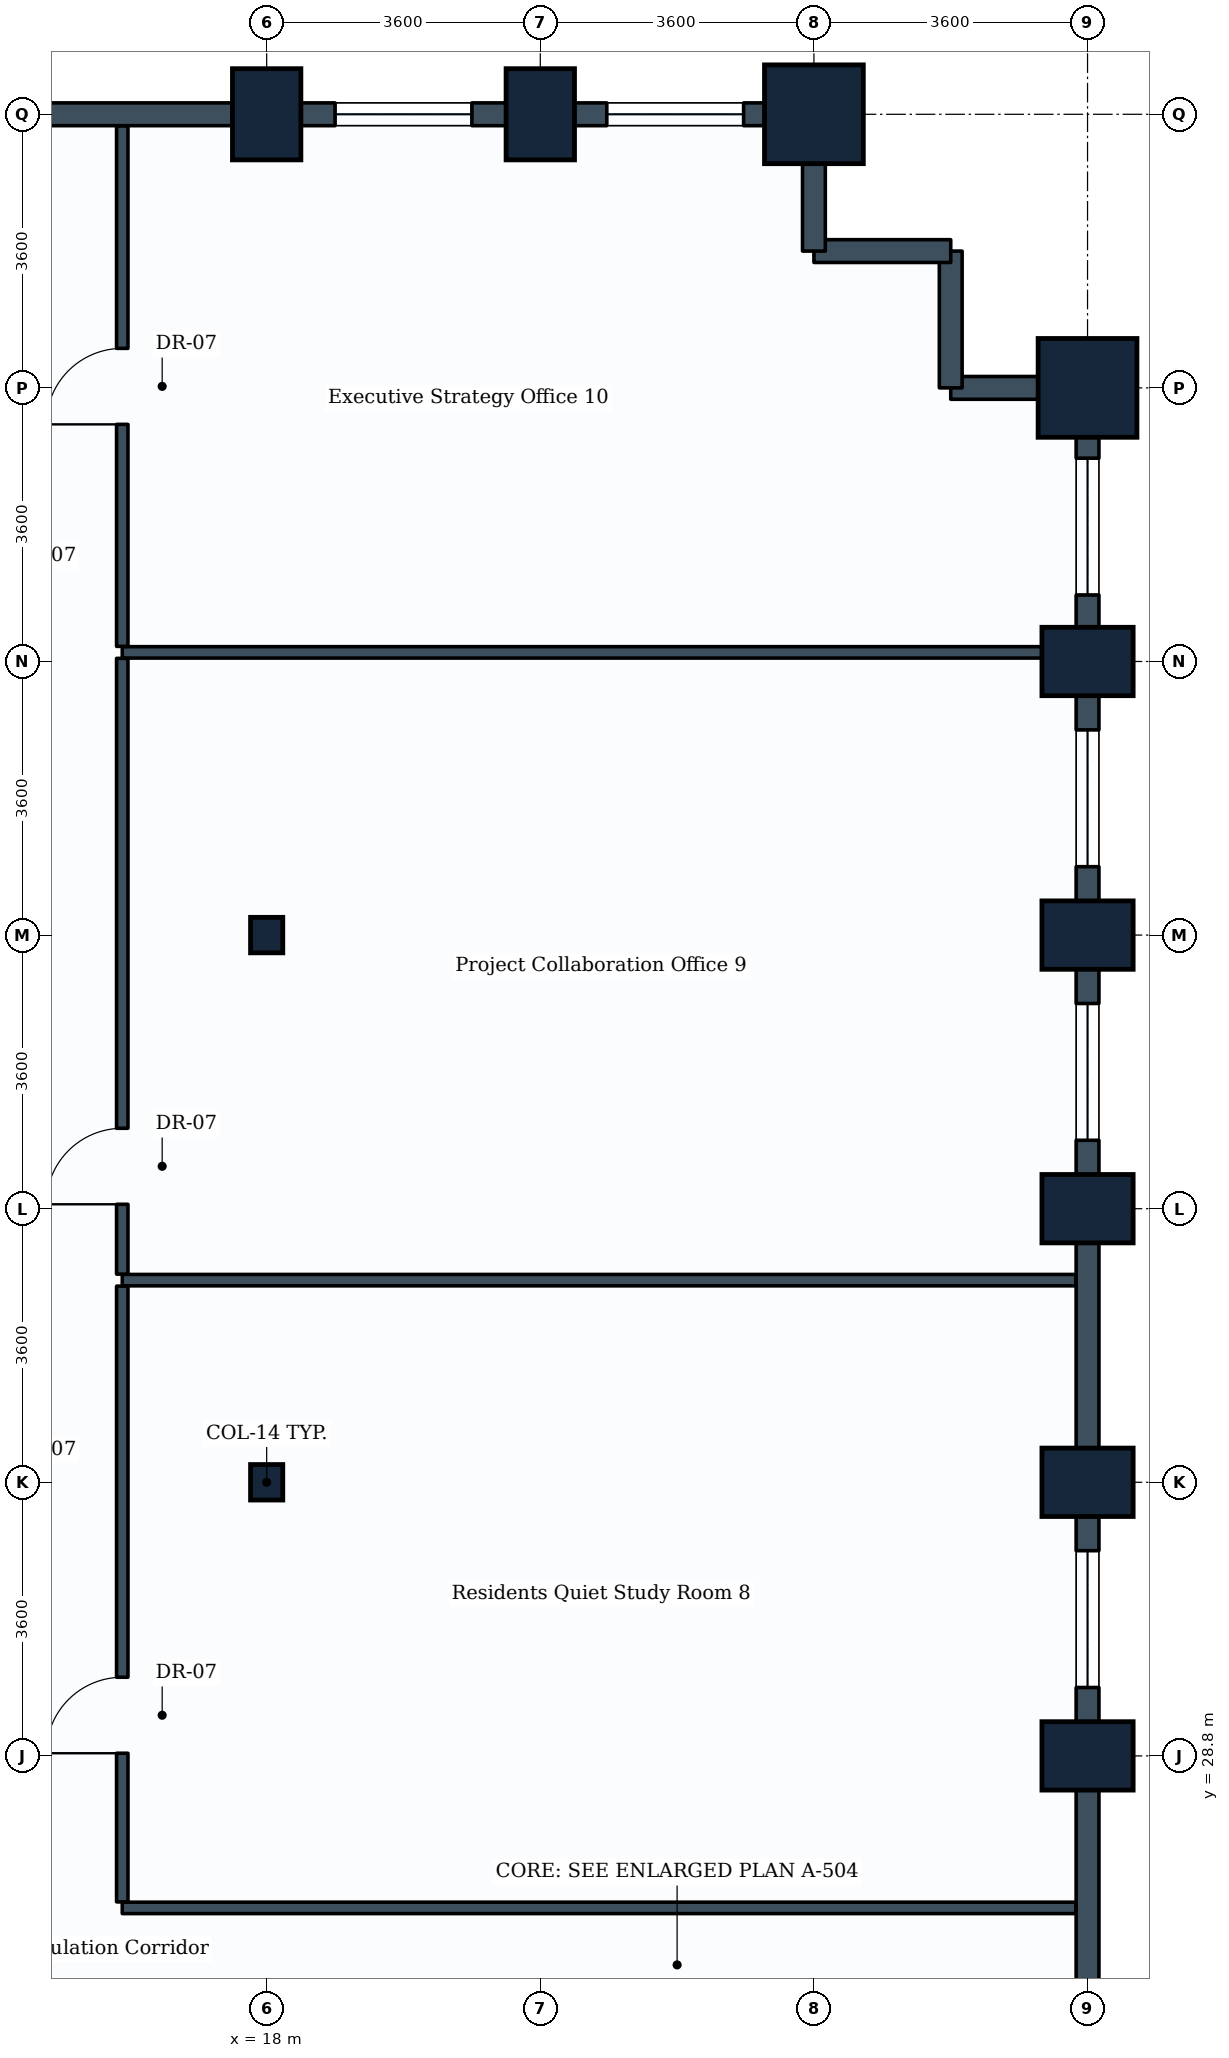
"""IFC4 building model, lengths in metres.
Left out: names, types, materials, properties, quantities, classifications, styles, units other than length and angle.
Written with IfcOpenShell. Run it as: python <this file> out.ifc"""

import sys

from ifc_helpers import new_model, si_unit, direction, frame, frame_2d, origin, origin_2d, place, context, subcontext, project, spatial, rectangle, i_section, extrude, element, fill, save


model = new_model("IFC4")
c1 = context("Model", 3, precision=1e-05, world=origin(), true_north=direction((0.0, 1.0)))
c2 = subcontext(c1, "Body", "Model", "MODEL_VIEW")
j1 = project(units=[si_unit("LENGTHUNIT", "METRE"), si_unit("PLANEANGLEUNIT", "RADIAN")], contexts=[c1])
p1 = place(None, origin())
s1 = spatial("IfcSite", under=j1, at=p1, CompositionType="ELEMENT")
p2 = place(p1, origin())
s2 = spatial("IfcBuilding", under=s1, at=p2, CompositionType="ELEMENT")
p3 = place(p2, frame((0.0, 0.0, 63.0)))
s3 = spatial("IfcBuildingStorey", under=s2, at=p3, CompositionType="ELEMENT", Elevation=63.0)
for number, where, z_axis, x_axis in (
    (1, (18.0, 32.4, 0.0), (0.0, 0.0, 1.0), (1.0, 0.0, 0.0)),
    (2, (18.0, 39.6, 0.0), (0.0, 0.0, 1.0), (1.0, 0.0, 0.0)),
):
    element("IfcColumn", number, at=place(p3, frame(where, z_axis=z_axis, x_axis=x_axis)), inside=s3, PredefinedType="COLUMN", context=c2, shape_type="SweptSolid", body=[
        extrude(i_section(OverallWidth=0.424, OverallDepth=0.467, WebThickness=0.033, FlangeThickness=0.053, FilletRadius=0.015, at=origin_2d()), origin(), (0.0, 0.0, 1.0), 3.9),
    ])
for number, where, z_axis, x_axis in (
    (3, (18.0, 50.4, 0.0), (0.0, 0.0, 1.0), (1.0, 0.0, 0.0)),
    (4, (21.6, 50.4, 0.0), (0.0, 0.0, 1.0), (1.0, 0.0, 0.0)),
):
    element("IfcColumn", number, at=place(p3, frame(where, z_axis=z_axis, x_axis=x_axis)), inside=s3, PredefinedType="COLUMN", context=c2, shape_type="SweptSolid", body=[
        extrude(rectangle(XDim=0.9, YDim=1.2, at=origin_2d()), origin(), (0.0, 0.0, 1.0), 3.9),
    ])
p4 = place(p3, frame((25.2, 50.4, 0.0), z_axis=(0.0, 0.0, 1.0), x_axis=(1.0, 0.0, 0.0)))
e5 = element("IfcColumn", 5, at=p4, inside=s3, PredefinedType="COLUMN", context=c2, shape_type="SweptSolid", body=[
    extrude(rectangle(XDim=1.3, YDim=1.3, at=origin_2d()), origin(), (0.0, 0.0, 1.0), 3.9),
])
for number, where, z_axis, x_axis in (
    (6, (28.8, 28.8, 0.0), (0.0, 0.0, 1.0), (0.0, 1.0, 0.0)),
    (7, (28.8, 32.4, 0.0), (0.0, 0.0, 1.0), (0.0, 1.0, 0.0)),
    (8, (28.8, 36.0, 0.0), (0.0, 0.0, 1.0), (0.0, 1.0, 0.0)),
    (9, (28.8, 39.6, 0.0), (0.0, 0.0, 1.0), (0.0, 1.0, 0.0)),
    (10, (28.8, 43.2, 0.0), (0.0, 0.0, 1.0), (0.0, 1.0, 0.0)),
):
    element("IfcColumn", number, at=place(p3, frame(where, z_axis=z_axis, x_axis=x_axis)), inside=s3, PredefinedType="COLUMN", context=c2, shape_type="SweptSolid", body=[
        extrude(rectangle(XDim=0.9, YDim=1.2, at=origin_2d()), origin(), (0.0, 0.0, 1.0), 3.9),
    ])
p5 = place(p3, frame((28.8, 46.8, 0.0), z_axis=(0.0, 0.0, 1.0), x_axis=(0.0, 1.0, 0.0)))
e11 = element("IfcColumn", 11, at=p5, inside=s3, PredefinedType="COLUMN", context=c2, shape_type="SweptSolid", body=[
    extrude(rectangle(XDim=1.3, YDim=1.3, at=origin_2d()), origin(), (0.0, 0.0, 1.0), 3.9),
])
p6 = place(p3, frame((28.8, 25.2, 0.0), z_axis=(0.0, 0.0, 1.0), x_axis=(0.0, 1.0, 0.0)))
e12 = element("IfcWall", 12, at=p6, inside=s3, PredefinedType="STANDARD", context=c2, shape_type="SweptSolid", body=[
    extrude(rectangle(XDim=3.6, YDim=0.3, at=frame_2d((1.8, 0.0))), origin(), (0.0, 0.0, 1.0), 3.14),
])
p7 = place(p3, frame((28.8, 28.8, 0.0), z_axis=(0.0, 0.0, 1.0), x_axis=(0.0, 1.0, 0.0)))
e13 = element("IfcWall", 13, at=p7, inside=s3, PredefinedType="STANDARD", context=c2, shape_type="SweptSolid", body=[
    extrude(rectangle(XDim=3.6, YDim=0.3, at=frame_2d((1.8, 0.0))), origin(), (0.0, 0.0, 1.0), 2.93),
])
p8 = place(p7, frame((0.9, 0.0, 0.85)))
e14 = element("IfcOpeningElement", 14, at=p8, cuts=e13, PredefinedType="OPENING", context=c2, shape_type="SweptSolid", body=[
    extrude(rectangle(XDim=1.8, YDim=1.35, at=frame_2d((0.9, 0.675))), frame((0.0, 0.16, 0.0), z_axis=(0.0, -1.0, 0.0), x_axis=(1.0, 0.0, 0.0)), (0.0, 0.0, 1.0), 0.32),
])
p9 = place(p3, frame((28.8, 32.4, 0.0), z_axis=(0.0, 0.0, 1.0), x_axis=(0.0, 1.0, 0.0)))
e15 = element("IfcWall", 15, at=p9, inside=s3, PredefinedType="STANDARD", context=c2, shape_type="SweptSolid", body=[
    extrude(rectangle(XDim=3.6, YDim=0.3, at=frame_2d((1.8, 0.0))), origin(), (0.0, 0.0, 1.0), 2.93),
])
p10 = place(p3, frame((28.8, 36.0, 0.0), z_axis=(0.0, 0.0, 1.0), x_axis=(0.0, 1.0, 0.0)))
e16 = element("IfcWall", 16, at=p10, inside=s3, PredefinedType="STANDARD", context=c2, shape_type="SweptSolid", body=[
    extrude(rectangle(XDim=3.6, YDim=0.3, at=frame_2d((1.8, 0.0))), origin(), (0.0, 0.0, 1.0), 2.93),
])
p11 = place(p10, frame((0.9, 0.0, 0.85)))
e17 = element("IfcOpeningElement", 17, at=p11, cuts=e16, PredefinedType="OPENING", context=c2, shape_type="SweptSolid", body=[
    extrude(rectangle(XDim=1.8, YDim=1.35, at=frame_2d((0.9, 0.675))), frame((0.0, 0.16, 0.0), z_axis=(0.0, -1.0, 0.0), x_axis=(1.0, 0.0, 0.0)), (0.0, 0.0, 1.0), 0.32),
])
p12 = place(p3, frame((28.8, 39.6, 0.0), z_axis=(0.0, 0.0, 1.0), x_axis=(0.0, 1.0, 0.0)))
e18 = element("IfcWall", 18, at=p12, inside=s3, PredefinedType="STANDARD", context=c2, shape_type="SweptSolid", body=[
    extrude(rectangle(XDim=3.6, YDim=0.3, at=frame_2d((1.8, 0.0))), origin(), (0.0, 0.0, 1.0), 2.93),
])
p13 = place(p12, frame((0.9, 0.0, 0.85)))
e19 = element("IfcOpeningElement", 19, at=p13, cuts=e18, PredefinedType="OPENING", context=c2, shape_type="SweptSolid", body=[
    extrude(rectangle(XDim=1.8, YDim=1.35, at=frame_2d((0.9, 0.675))), frame((0.0, 0.16, 0.0), z_axis=(0.0, -1.0, 0.0), x_axis=(1.0, 0.0, 0.0)), (0.0, 0.0, 1.0), 0.32),
])
p14 = place(p3, frame((28.8, 43.2, 0.0), z_axis=(0.0, 0.0, 1.0), x_axis=(0.0, 1.0, 0.0)))
e20 = element("IfcWall", 20, at=p14, inside=s3, PredefinedType="STANDARD", context=c2, shape_type="SweptSolid", body=[
    extrude(rectangle(XDim=3.6, YDim=0.3, at=frame_2d((1.8, 0.0))), origin(), (0.0, 0.0, 1.0), 2.93),
])
p15 = place(p14, frame((0.875, 0.0, 0.85)))
e21 = element("IfcOpeningElement", 21, at=p15, cuts=e20, PredefinedType="OPENING", context=c2, shape_type="SweptSolid", body=[
    extrude(rectangle(XDim=1.8, YDim=1.35, at=frame_2d((0.9, 0.675))), frame((0.0, 0.16, 0.0), z_axis=(0.0, -1.0, 0.0), x_axis=(1.0, 0.0, 0.0)), (0.0, 0.0, 1.0), 0.32),
])
p16 = place(p3, frame((27.0, 46.8, 0.0), z_axis=(0.0, 0.0, 1.0), x_axis=(1.0, 0.0, 0.0)))
e22 = element("IfcWall", 22, at=p16, inside=s3, PredefinedType="STANDARD", context=c2, shape_type="SweptSolid", body=[
    extrude(rectangle(XDim=1.8, YDim=0.3, at=frame_2d((0.9, 0.0))), origin(), (0.0, 0.0, 1.0), 2.93),
])
for number, where, z_axis, x_axis in (
    (23, (27.0, 46.8, 0.0), (0.0, 0.0, 1.0), (0.0, 1.0, 0.0)),
    (24, (25.2, 48.6, 0.0), (0.0, 0.0, 1.0), (1.0, 0.0, 0.0)),
):
    element("IfcWall", number, at=place(p3, frame(where, z_axis=z_axis, x_axis=x_axis)), inside=s3, PredefinedType="STANDARD", context=c2, shape_type="SweptSolid", body=[
        extrude(rectangle(XDim=1.8, YDim=0.3, at=frame_2d((0.9, 0.0))), origin(), (0.0, 0.0, 1.0), 3.635),
    ])
p17 = place(p3, frame((25.2, 48.6, 0.0), z_axis=(0.0, 0.0, 1.0), x_axis=(0.0, 1.0, 0.0)))
e25 = element("IfcWall", 25, at=p17, inside=s3, PredefinedType="STANDARD", context=c2, shape_type="SweptSolid", body=[
    extrude(rectangle(XDim=1.8, YDim=0.3, at=frame_2d((0.9, 0.0))), origin(), (0.0, 0.0, 1.0), 2.93),
])
p18 = place(p3, frame((21.6, 50.4, 0.0), z_axis=(0.0, 0.0, 1.0), x_axis=(1.0, 0.0, 0.0)))
e26 = element("IfcWall", 26, at=p18, inside=s3, PredefinedType="STANDARD", context=c2, shape_type="SweptSolid", body=[
    extrude(rectangle(XDim=3.6, YDim=0.3, at=frame_2d((1.8, 0.0))), origin(), (0.0, 0.0, 1.0), 2.93),
])
p19 = place(p18, frame((0.875, 0.0, 0.85)))
e27 = element("IfcOpeningElement", 27, at=p19, cuts=e26, PredefinedType="OPENING", context=c2, shape_type="SweptSolid", body=[
    extrude(rectangle(XDim=1.8, YDim=1.35, at=frame_2d((0.9, 0.675))), frame((0.0, 0.16, 0.0), z_axis=(0.0, -1.0, 0.0), x_axis=(1.0, 0.0, 0.0)), (0.0, 0.0, 1.0), 0.32),
])
p20 = place(p3, frame((18.0, 50.4, 0.0), z_axis=(0.0, 0.0, 1.0), x_axis=(1.0, 0.0, 0.0)))
e28 = element("IfcWall", 28, at=p20, inside=s3, PredefinedType="STANDARD", context=c2, shape_type="SweptSolid", body=[
    extrude(rectangle(XDim=3.6, YDim=0.3, at=frame_2d((1.8, 0.0))), origin(), (0.0, 0.0, 1.0), 2.93),
])
p21 = place(p20, frame((0.9, 0.0, 0.85)))
e29 = element("IfcOpeningElement", 29, at=p21, cuts=e28, PredefinedType="OPENING", context=c2, shape_type="SweptSolid", body=[
    extrude(rectangle(XDim=1.8, YDim=1.35, at=frame_2d((0.9, 0.675))), frame((0.0, 0.16, 0.0), z_axis=(0.0, -1.0, 0.0), x_axis=(1.0, 0.0, 0.0)), (0.0, 0.0, 1.0), 0.32),
])
p22 = place(p3, frame((14.4, 50.4, 0.0), z_axis=(0.0, 0.0, 1.0), x_axis=(1.0, 0.0, 0.0)))
e30 = element("IfcWall", 30, at=p22, inside=s3, PredefinedType="STANDARD", context=c2, shape_type="SweptSolid", body=[
    extrude(rectangle(XDim=3.6, YDim=0.3, at=frame_2d((1.8, 0.0))), origin(), (0.0, 0.0, 1.0), 2.93),
])
p23 = place(p3, frame((16.1, 26.8, 0.0), z_axis=(0.0, 0.0, 1.0), x_axis=(1.0, 0.0, 0.0)))
e31 = element("IfcWall", 31, at=p23, inside=s3, PredefinedType="PARTITIONING", context=c2, shape_type="SweptSolid", body=[
    extrude(rectangle(XDim=12.546, YDim=0.15, at=frame_2d((6.273, 0.0))), origin(), (0.0, 0.0, 1.0), 3.08),
])
p24 = place(p3, frame((16.1, 35.06, 0.0), z_axis=(0.0, 0.0, 1.0), x_axis=(1.0, 0.0, 0.0)))
e32 = element("IfcWall", 32, at=p24, inside=s3, PredefinedType="PARTITIONING", context=c2, shape_type="SweptSolid", body=[
    extrude(rectangle(XDim=12.546, YDim=0.15, at=frame_2d((6.273, 0.0))), origin(), (0.0, 0.0, 1.0), 2.93),
])
p25 = place(p3, frame((16.1, 26.879, 0.0), z_axis=(0.0, 0.0, 1.0), x_axis=(0.0, 1.0, 0.0)))
e33 = element("IfcWall", 33, at=p25, inside=s3, PredefinedType="PARTITIONING", context=c2, shape_type="SweptSolid", body=[
    extrude(rectangle(XDim=8.102, YDim=0.15, at=frame_2d((4.051, 0.0))), origin(), (0.0, 0.0, 1.0), 3.08),
])
p26 = place(p25, frame((1.956, 0.0, 0.0)))
e34 = element("IfcOpeningElement", 34, at=p26, cuts=e33, PredefinedType="OPENING", context=c2, shape_type="SweptSolid", body=[
    extrude(rectangle(XDim=1.0, YDim=2.1, at=frame_2d((0.5, 1.05))), frame((0.0, 0.085, 0.0), z_axis=(0.0, -1.0, 0.0), x_axis=(1.0, 0.0, 0.0)), (0.0, 0.0, 1.0), 0.17),
])
p27 = place(p3, frame((16.1, 43.32, 0.0), z_axis=(0.0, 0.0, 1.0), x_axis=(1.0, 0.0, 0.0)))
e35 = element("IfcWall", 35, at=p27, inside=s3, PredefinedType="PARTITIONING", context=c2, shape_type="SweptSolid", body=[
    extrude(rectangle(XDim=12.546, YDim=0.15, at=frame_2d((6.273, 0.0))), origin(), (0.0, 0.0, 1.0), 2.93),
])
p28 = place(p3, frame((16.1, 35.139, 0.0), z_axis=(0.0, 0.0, 1.0), x_axis=(0.0, 1.0, 0.0)))
e36 = element("IfcWall", 36, at=p28, inside=s3, PredefinedType="PARTITIONING", context=c2, shape_type="SweptSolid", body=[
    extrude(rectangle(XDim=8.102, YDim=0.15, at=frame_2d((4.051, 0.0))), origin(), (0.0, 0.0, 1.0), 3.08),
])
p29 = place(p28, frame((0.919, 0.0, 0.0)))
e37 = element("IfcOpeningElement", 37, at=p29, cuts=e36, PredefinedType="OPENING", context=c2, shape_type="SweptSolid", body=[
    extrude(rectangle(XDim=1.0, YDim=2.1, at=frame_2d((0.5, 1.05))), frame((0.0, 0.085, 0.0), z_axis=(0.0, -1.0, 0.0), x_axis=(1.0, 0.0, 0.0)), (0.0, 0.0, 1.0), 0.17),
])
p30 = place(p3, frame((16.1, 43.399, 0.0), z_axis=(0.0, 0.0, 1.0), x_axis=(0.0, 1.0, 0.0)))
e38 = element("IfcWall", 38, at=p30, inside=s3, PredefinedType="PARTITIONING", context=c2, shape_type="SweptSolid", body=[
    extrude(rectangle(XDim=6.847, YDim=0.15, at=frame_2d((3.424, 0.0))), origin(), (0.0, 0.0, 1.0), 2.93),
])
p31 = place(p30, frame((2.921, 0.0, 0.0)))
e39 = element("IfcOpeningElement", 39, at=p31, cuts=e38, PredefinedType="OPENING", context=c2, shape_type="SweptSolid", body=[
    extrude(rectangle(XDim=1.0, YDim=2.1, at=frame_2d((0.5, 1.05))), frame((0.0, 0.085, 0.0), z_axis=(0.0, -1.0, 0.0), x_axis=(1.0, 0.0, 0.0)), (0.0, 0.0, 1.0), 0.17),
])
p32 = place(p8, origin())
e40 = element("IfcWindow", 40, at=p32, inside=s3, PartitioningType="SINGLE_PANEL", PredefinedType="WINDOW", context=c2, shape_type="SweptSolid", body=[
    extrude(rectangle(XDim=1.8, YDim=1.35, at=frame_2d((0.9, 0.675))), frame((0.0, 0.03, 0.0), z_axis=(0.0, -1.0, 0.0), x_axis=(1.0, 0.0, 0.0)), (0.0, 0.0, 1.0), 0.06),
])
fill(e14, e40)
p33 = place(p11, origin())
e41 = element("IfcWindow", 41, at=p33, inside=s3, PartitioningType="SINGLE_PANEL", PredefinedType="WINDOW", context=c2, shape_type="SweptSolid", body=[
    extrude(rectangle(XDim=1.8, YDim=1.35, at=frame_2d((0.9, 0.675))), frame((0.0, 0.03, 0.0), z_axis=(0.0, -1.0, 0.0), x_axis=(1.0, 0.0, 0.0)), (0.0, 0.0, 1.0), 0.06),
])
fill(e17, e41)
p34 = place(p13, origin())
e42 = element("IfcWindow", 42, at=p34, inside=s3, PartitioningType="SINGLE_PANEL", PredefinedType="WINDOW", context=c2, shape_type="SweptSolid", body=[
    extrude(rectangle(XDim=1.8, YDim=1.35, at=frame_2d((0.9, 0.675))), frame((0.0, 0.03, 0.0), z_axis=(0.0, -1.0, 0.0), x_axis=(1.0, 0.0, 0.0)), (0.0, 0.0, 1.0), 0.06),
])
fill(e19, e42)
p35 = place(p15, origin())
e43 = element("IfcWindow", 43, at=p35, inside=s3, PartitioningType="SINGLE_PANEL", PredefinedType="WINDOW", context=c2, shape_type="SweptSolid", body=[
    extrude(rectangle(XDim=1.8, YDim=1.35, at=frame_2d((0.9, 0.675))), frame((0.0, 0.03, 0.0), z_axis=(0.0, -1.0, 0.0), x_axis=(1.0, 0.0, 0.0)), (0.0, 0.0, 1.0), 0.06),
])
fill(e21, e43)
p36 = place(p19, origin())
e44 = element("IfcWindow", 44, at=p36, inside=s3, PartitioningType="SINGLE_PANEL", PredefinedType="WINDOW", context=c2, shape_type="SweptSolid", body=[
    extrude(rectangle(XDim=1.8, YDim=1.35, at=frame_2d((0.9, 0.675))), frame((0.0, 0.03, 0.0), z_axis=(0.0, -1.0, 0.0), x_axis=(1.0, 0.0, 0.0)), (0.0, 0.0, 1.0), 0.06),
])
fill(e27, e44)
p37 = place(p21, origin())
e45 = element("IfcWindow", 45, at=p37, inside=s3, PartitioningType="SINGLE_PANEL", PredefinedType="WINDOW", context=c2, shape_type="SweptSolid", body=[
    extrude(rectangle(XDim=1.8, YDim=1.35, at=frame_2d((0.9, 0.675))), frame((0.0, 0.03, 0.0), z_axis=(0.0, -1.0, 0.0), x_axis=(1.0, 0.0, 0.0)), (0.0, 0.0, 1.0), 0.06),
])
fill(e29, e45)
p38 = place(p26, origin())
e46 = element("IfcDoor", 46, at=p38, inside=s3, OperationType="SINGLE_SWING_LEFT", PredefinedType="DOOR", context=c2, shape_type="SweptSolid", body=[
    extrude(rectangle(XDim=1.0, YDim=2.1, at=frame_2d((0.5, 1.05))), frame((0.0, 0.025, 0.0), z_axis=(0.0, -1.0, 0.0), x_axis=(1.0, 0.0, 0.0)), (0.0, 0.0, 1.0), 0.05),
])
fill(e34, e46)
p39 = place(p29, origin())
e47 = element("IfcDoor", 47, at=p39, inside=s3, OperationType="SINGLE_SWING_LEFT", PredefinedType="DOOR", context=c2, shape_type="SweptSolid", body=[
    extrude(rectangle(XDim=1.0, YDim=2.1, at=frame_2d((0.5, 1.05))), frame((0.0, 0.025, 0.0), z_axis=(0.0, -1.0, 0.0), x_axis=(1.0, 0.0, 0.0)), (0.0, 0.0, 1.0), 0.05),
])
fill(e37, e47)
p40 = place(p31, origin())
e48 = element("IfcDoor", 48, at=p40, inside=s3, OperationType="SINGLE_SWING_LEFT", PredefinedType="DOOR", context=c2, shape_type="SweptSolid", body=[
    extrude(rectangle(XDim=1.0, YDim=2.1, at=frame_2d((0.5, 1.05))), frame((0.0, 0.025, 0.0), z_axis=(0.0, -1.0, 0.0), x_axis=(1.0, 0.0, 0.0)), (0.0, 0.0, 1.0), 0.05),
])
fill(e39, e48)
save(model, sys.argv[1])
